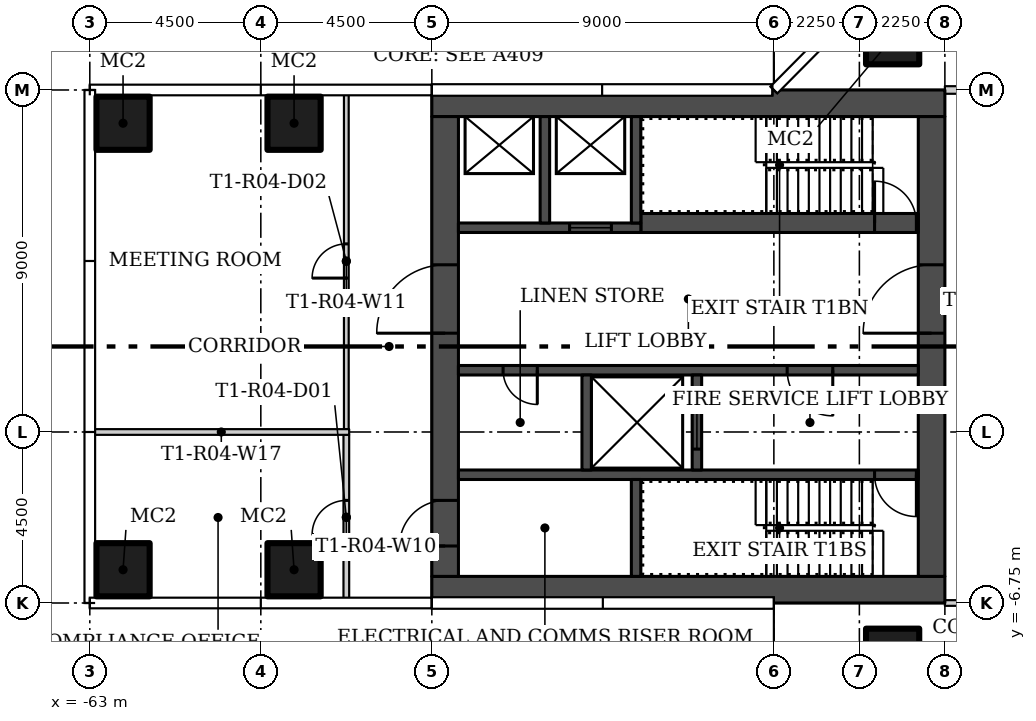
"""IFC4 building model, lengths in metres.
Left out: names, types, materials, properties, quantities, classifications, styles, units other than length and angle.
Written with IfcOpenShell. Run it as: python <this file> out.ifc"""

import sys

from ifc_helpers import new_model, si_unit, direction, frame, frame_2d, origin, origin_2d, place, context, subcontext, project, spatial, rectangle, hollow_rectangle, extrude, element, fill, save


model = new_model("IFC4")
c1 = context("Model", 3, precision=1e-05, world=origin(), true_north=direction((0.0, 1.0)))
c2 = subcontext(c1, "Body", "Model", "MODEL_VIEW")
j1 = project(units=[si_unit("LENGTHUNIT", "METRE"), si_unit("PLANEANGLEUNIT", "RADIAN")], contexts=[c1])
p1 = place(None, origin())
s1 = spatial("IfcSite", under=j1, at=p1, CompositionType="ELEMENT")
p2 = place(p1, origin())
s2 = spatial("IfcBuilding", under=s1, at=p2, CompositionType="ELEMENT")
p3 = place(p2, frame((0.0, 0.0, 49.8)))
s3 = spatial("IfcBuildingStorey", under=s2, at=p3, CompositionType="ELEMENT", Elevation=49.8)
for number, where in (
    (1, (-41.875, 8.125, 0.0)),
    (2, (-41.875, -8.125, 0.0)),
    (3, (-57.625, -5.875, 0.0)),
    (4, (-62.125, -5.875, 0.0)),
    (5, (-57.625, 5.875, 0.0)),
    (6, (-62.125, 5.875, 0.0)),
):
    element("IfcColumn", number, at=place(p3, frame(where)), inside=s3, PredefinedType="COLUMN", context=c2, shape_type="SweptSolid", body=[
        extrude(hollow_rectangle(XDim=1.4, YDim=1.4, WallThickness=0.05, at=origin_2d()), origin(), (0.0, 0.0, 1.0), 3.55),
    ])
p4 = place(p3, frame((-40.5, 6.75, 0.0)))
e7 = element("IfcWall", 7, at=p4, inside=s3, PredefinedType="PARTITIONING", context=c2, shape_type="SweptSolid", body=[
    extrude(rectangle(XDim=4.6, YDim=0.2, at=frame_2d((2.3, 0.0))), origin(), (0.0, 0.0, 1.0), 3.55),
])
p5 = place(p4, frame((1.5, 0.0, 0.0)))
e8 = element("IfcOpeningElement", 8, at=p5, cuts=e7, PredefinedType="OPENING", context=c2, shape_type="SweptSolid", body=[
    extrude(rectangle(XDim=1.5, YDim=2.1, at=frame_2d((0.75, 1.05))), frame((0.0, 0.11, 0.0), z_axis=(0.0, -1.0, 0.0), x_axis=(1.0, 0.0, 0.0)), (0.0, 0.0, 1.0), 0.22),
])
p6 = place(p3, frame((-27.0, -6.75, 0.0), z_axis=(0.0, 0.0, 1.0), x_axis=(-1.0, 0.0, 0.0)))
e9 = element("IfcWall", 9, at=p6, inside=s3, PredefinedType="PARTITIONING", context=c2, shape_type="SweptSolid", body=[
    extrude(rectangle(XDim=13.5, YDim=0.15, at=frame_2d((6.75, 0.0))), origin(), (0.0, 0.0, 1.0), 3.55),
])
p7 = place(p6, frame((6.0, 0.0, 0.0)))
e10 = element("IfcOpeningElement", 10, at=p7, cuts=e9, PredefinedType="OPENING", context=c2, shape_type="SweptSolid", body=[
    extrude(rectangle(XDim=1.5, YDim=2.1, at=frame_2d((0.75, 1.05))), frame((0.0, 0.085, 0.0), z_axis=(0.0, -1.0, 0.0), x_axis=(1.0, 0.0, 0.0)), (0.0, 0.0, 1.0), 0.17),
])
p8 = place(p3, frame((-56.25, -6.655, 0.0), z_axis=(0.0, 0.0, 1.0), x_axis=(0.0, 1.0, 0.0)))
e11 = element("IfcWall", 11, at=p8, inside=s3, PredefinedType="PARTITIONING", context=c2, shape_type="SweptSolid", body=[
    extrude(rectangle(XDim=4.33, YDim=0.15, at=frame_2d((2.165, 0.0))), origin(), (0.0, 0.0, 1.0), 3.55),
])
p9 = place(p8, frame((1.705, 0.0, 0.0)))
e12 = element("IfcOpeningElement", 12, at=p9, cuts=e11, PredefinedType="OPENING", context=c2, shape_type="SweptSolid", body=[
    extrude(rectangle(XDim=0.9, YDim=2.1, at=frame_2d((0.45, 1.05))), frame((0.0, 0.085, 0.0), z_axis=(0.0, -1.0, 0.0), x_axis=(1.0, 0.0, 0.0)), (0.0, 0.0, 1.0), 0.17),
])
p10 = place(p3, frame((-56.25, -2.175, 0.0), z_axis=(0.0, 0.0, 1.0), x_axis=(0.0, 1.0, 0.0)))
e13 = element("IfcWall", 13, at=p10, inside=s3, PredefinedType="PARTITIONING", context=c2, shape_type="SweptSolid", body=[
    extrude(rectangle(XDim=8.83, YDim=0.125, at=frame_2d((4.415, 0.0))), origin(), (0.0, 0.0, 1.0), 3.55),
])
p11 = place(p10, frame((3.975, 0.0, 0.0)))
e14 = element("IfcOpeningElement", 14, at=p11, cuts=e13, PredefinedType="OPENING", context=c2, shape_type="SweptSolid", body=[
    extrude(rectangle(XDim=0.9, YDim=2.1, at=frame_2d((0.45, 1.05))), frame((0.0, 0.073, 0.0), z_axis=(0.0, -1.0, 0.0), x_axis=(1.0, 0.0, 0.0)), (0.0, 0.0, 1.0), 0.145),
])
p12 = place(p3, frame((-56.175, -2.25, 0.0), z_axis=(0.0, 0.0, 1.0), x_axis=(-1.0, 0.0, 0.0)))
e15 = element("IfcWall", 15, at=p12, inside=s3, PredefinedType="PARTITIONING", context=c2, shape_type="SweptSolid", body=[
    extrude(rectangle(XDim=6.73, YDim=0.15, at=frame_2d((3.365, 0.0))), origin(), (0.0, 0.0, 1.0), 3.55),
])
for number, where, z_axis, x_axis in (
    (16, (-40.5, -6.4, 0.0), (0.0, 0.0, 1.0), (-1.0, 0.0, 0.0)),
    (17, (-40.5, 6.4, 0.0), (0.0, 0.0, 1.0), (-1.0, 0.0, 0.0)),
):
    element("IfcWall", number, at=place(p3, frame(where, z_axis=z_axis, x_axis=x_axis)), inside=s3, PredefinedType="SHEAR", context=c2, shape_type="SweptSolid", body=[
        extrude(rectangle(XDim=13.5, YDim=0.7, at=frame_2d((6.75, 0.0))), origin(), (0.0, 0.0, 1.0), 3.55),
    ])
p13 = place(p3, frame((-40.85, -6.05, 0.0), z_axis=(0.0, 0.0, 1.0), x_axis=(0.0, 1.0, 0.0)))
e18 = element("IfcWall", 18, at=p13, inside=s3, PredefinedType="SHEAR", context=c2, shape_type="SweptSolid", body=[
    extrude(rectangle(XDim=12.1, YDim=0.7, at=frame_2d((6.05, 0.0))), origin(), (0.0, 0.0, 1.0), 3.55),
])
p14 = place(p13, frame((6.4, 0.0, 0.0)))
e19 = element("IfcOpeningElement", 19, at=p14, cuts=e18, PredefinedType="OPENING", context=c2, shape_type="SweptSolid", body=[
    extrude(rectangle(XDim=1.8, YDim=2.4, at=frame_2d((0.9, 1.2))), frame((0.0, 0.36, 0.0), z_axis=(0.0, -1.0, 0.0), x_axis=(1.0, 0.0, 0.0)), (0.0, 0.0, 1.0), 0.72),
])
p15 = place(p3, frame((-53.65, -6.05, 0.0), z_axis=(0.0, 0.0, 1.0), x_axis=(0.0, 1.0, 0.0)))
e20 = element("IfcWall", 20, at=p15, inside=s3, PredefinedType="SHEAR", context=c2, shape_type="SweptSolid", body=[
    extrude(rectangle(XDim=12.1, YDim=0.7, at=frame_2d((6.05, 0.0))), origin(), (0.0, 0.0, 1.0), 3.55),
])
p16 = place(p15, frame((0.8, 0.0, 0.0)))
e21 = element("IfcOpeningElement", 21, at=p16, cuts=e20, PredefinedType="OPENING", context=c2, shape_type="SweptSolid", body=[
    extrude(rectangle(XDim=1.2, YDim=2.1, at=frame_2d((0.6, 1.05))), frame((0.0, 0.36, 0.0), z_axis=(0.0, -1.0, 0.0), x_axis=(1.0, 0.0, 0.0)), (0.0, 0.0, 1.0), 0.72),
])
p17 = place(p15, frame((6.4, 0.0, 0.0)))
e22 = element("IfcOpeningElement", 22, at=p17, cuts=e20, PredefinedType="OPENING", context=c2, shape_type="SweptSolid", body=[
    extrude(rectangle(XDim=1.8, YDim=2.4, at=frame_2d((0.9, 1.2))), frame((0.0, 0.36, 0.0), z_axis=(0.0, -1.0, 0.0), x_axis=(1.0, 0.0, 0.0)), (0.0, 0.0, 1.0), 0.72),
])
p18 = place(p3, frame((-41.2, -3.375, 0.0), z_axis=(0.0, 0.0, 1.0), x_axis=(-1.0, 0.0, 0.0)))
e23 = element("IfcWall", 23, at=p18, inside=s3, PredefinedType="SHEAR", context=c2, shape_type="SweptSolid", body=[
    extrude(rectangle(XDim=12.1, YDim=0.25, at=frame_2d((6.05, 0.0))), origin(), (0.0, 0.0, 1.0), 3.55),
])
p19 = place(p18, frame((0.05, 0.0, 0.0)))
e24 = element("IfcOpeningElement", 24, at=p19, cuts=e23, PredefinedType="OPENING", context=c2, shape_type="SweptSolid", body=[
    extrude(rectangle(XDim=1.1, YDim=2.1, at=frame_2d((0.55, 1.05))), frame((0.0, 0.135, 0.0), z_axis=(0.0, -1.0, 0.0), x_axis=(1.0, 0.0, 0.0)), (0.0, 0.0, 1.0), 0.27),
])
p20 = place(p3, frame((-48.625, -6.05, 0.0), z_axis=(0.0, 0.0, 1.0), x_axis=(0.0, 1.0, 0.0)))
e25 = element("IfcWall", 25, at=p20, inside=s3, PredefinedType="SHEAR", context=c2, shape_type="SweptSolid", body=[
    extrude(rectangle(XDim=2.55, YDim=0.25, at=frame_2d((1.275, 0.0))), origin(), (0.0, 0.0, 1.0), 3.55),
])
p21 = place(p3, frame((-41.2, -0.625, 0.0), z_axis=(0.0, 0.0, 1.0), x_axis=(-1.0, 0.0, 0.0)))
e26 = element("IfcWall", 26, at=p21, inside=s3, PredefinedType="SHEAR", context=c2, shape_type="SweptSolid", body=[
    extrude(rectangle(XDim=12.1, YDim=0.25, at=frame_2d((6.05, 0.0))), origin(), (0.0, 0.0, 1.0), 3.55),
])
p22 = place(p21, frame((2.25, 0.0, 0.0)))
e27 = element("IfcOpeningElement", 27, at=p22, cuts=e26, PredefinedType="OPENING", context=c2, shape_type="SweptSolid", body=[
    extrude(rectangle(XDim=1.2, YDim=2.1, at=frame_2d((0.6, 1.05))), frame((0.0, 0.135, 0.0), z_axis=(0.0, -1.0, 0.0), x_axis=(1.0, 0.0, 0.0)), (0.0, 0.0, 1.0), 0.27),
])
p23 = place(p21, frame((10.025, 0.0, 0.0)))
e28 = element("IfcOpeningElement", 28, at=p23, cuts=e26, PredefinedType="OPENING", context=c2, shape_type="SweptSolid", body=[
    extrude(rectangle(XDim=0.9, YDim=2.1, at=frame_2d((0.45, 1.05))), frame((0.0, 0.135, 0.0), z_axis=(0.0, -1.0, 0.0), x_axis=(1.0, 0.0, 0.0)), (0.0, 0.0, 1.0), 0.27),
])
p24 = place(p3, frame((-47.025, -3.25, 0.0), z_axis=(0.0, 0.0, 1.0), x_axis=(0.0, 1.0, 0.0)))
e29 = element("IfcWall", 29, at=p24, inside=s3, PredefinedType="SHEAR", context=c2, shape_type="SweptSolid", body=[
    extrude(rectangle(XDim=2.5, YDim=0.25, at=frame_2d((1.25, 0.0))), origin(), (0.0, 0.0, 1.0), 3.55),
])
p25 = place(p24, frame((0.55, 0.0, 0.0)))
e30 = element("IfcOpeningElement", 30, at=p25, cuts=e29, PredefinedType="OPENING", context=c2, shape_type="SweptSolid", body=[
    extrude(rectangle(XDim=1.4, YDim=2.4, at=frame_2d((0.7, 1.2))), frame((0.0, 0.135, 0.0), z_axis=(0.0, -1.0, 0.0), x_axis=(1.0, 0.0, 0.0)), (0.0, 0.0, 1.0), 0.27),
])
p26 = place(p3, frame((-49.925, -3.25, 0.0), z_axis=(0.0, 0.0, 1.0), x_axis=(0.0, 1.0, 0.0)))
e31 = element("IfcWall", 31, at=p26, inside=s3, PredefinedType="SHEAR", context=c2, shape_type="SweptSolid", body=[
    extrude(rectangle(XDim=2.5, YDim=0.25, at=frame_2d((1.25, 0.0))), origin(), (0.0, 0.0, 1.0), 3.55),
])
p27 = place(p3, frame((-48.5, 3.25, 0.0)))
e32 = element("IfcWall", 32, at=p27, inside=s3, PredefinedType="SHEAR", context=c2, shape_type="SweptSolid", body=[
    extrude(rectangle(XDim=7.3, YDim=0.5, at=frame_2d((3.65, 0.0))), origin(), (0.0, 0.0, 1.0), 3.55),
])
p28 = place(p27, frame((6.15, 0.0, 0.0)))
e33 = element("IfcOpeningElement", 33, at=p28, cuts=e32, PredefinedType="OPENING", context=c2, shape_type="SweptSolid", body=[
    extrude(rectangle(XDim=1.1, YDim=2.1, at=frame_2d((0.55, 1.05))), frame((0.0, 0.26, 0.0), z_axis=(0.0, -1.0, 0.0), x_axis=(1.0, 0.0, 0.0)), (0.0, 0.0, 1.0), 0.52),
])
p29 = place(p3, frame((-48.5, 3.125, 0.0), z_axis=(0.0, 0.0, 1.0), x_axis=(-1.0, 0.0, 0.0)))
e34 = element("IfcWall", 34, at=p29, inside=s3, PredefinedType="SHEAR", context=c2, shape_type="SweptSolid", body=[
    extrude(rectangle(XDim=4.8, YDim=0.25, at=frame_2d((2.4, 0.0))), origin(), (0.0, 0.0, 1.0), 3.55),
])
p30 = place(p29, frame((0.775, 0.0, 0.0)))
e35 = element("IfcOpeningElement", 35, at=p30, cuts=e34, PredefinedType="OPENING", context=c2, shape_type="SweptSolid", body=[
    extrude(rectangle(XDim=1.1, YDim=2.1, at=frame_2d((0.55, 1.05))), frame((0.0, 0.135, 0.0), z_axis=(0.0, -1.0, 0.0), x_axis=(1.0, 0.0, 0.0)), (0.0, 0.0, 1.0), 0.27),
])
for number, where, z_axis, x_axis in (
    (36, (-48.625, 3.25, 0.0), (0.0, 0.0, 1.0), (0.0, 1.0, 0.0)),
    (37, (-51.025, 3.25, 0.0), (0.0, 0.0, 1.0), (0.0, 1.0, 0.0)),
):
    element("IfcWall", number, at=place(p3, frame(where, z_axis=z_axis, x_axis=x_axis)), inside=s3, PredefinedType="SHEAR", context=c2, shape_type="SweptSolid", body=[
        extrude(rectangle(XDim=2.8, YDim=0.25, at=frame_2d((1.4, 0.0))), origin(), (0.0, 0.0, 1.0), 3.55),
    ])
p31 = place(p9, origin())
e38 = element("IfcDoor", 38, at=p31, inside=s3, OperationType="SINGLE_SWING_LEFT", PredefinedType="DOOR", context=c2, shape_type="SweptSolid", body=[
    extrude(rectangle(XDim=0.9, YDim=2.1, at=frame_2d((0.45, 1.05))), frame((0.0, 0.025, 0.0), z_axis=(0.0, -1.0, 0.0), x_axis=(1.0, 0.0, 0.0)), (0.0, 0.0, 1.0), 0.05),
])
fill(e12, e38)
p32 = place(p11, origin())
e39 = element("IfcDoor", 39, at=p32, inside=s3, OperationType="SINGLE_SWING_RIGHT", PredefinedType="DOOR", context=c2, shape_type="SweptSolid", body=[
    extrude(rectangle(XDim=0.9, YDim=2.1, at=frame_2d((0.45, 1.05))), frame((0.0, 0.025, 0.0), z_axis=(0.0, -1.0, 0.0), x_axis=(1.0, 0.0, 0.0)), (0.0, 0.0, 1.0), 0.05),
])
fill(e14, e39)
p33 = place(p14, origin())
e40 = element("IfcDoor", 40, at=p33, inside=s3, OperationType="DOUBLE_DOOR_SINGLE_SWING", PredefinedType="DOOR", context=c2, shape_type="SweptSolid", body=[
    extrude(rectangle(XDim=1.8, YDim=2.4, at=frame_2d((0.9, 1.2))), frame((0.0, 0.025, 0.0), z_axis=(0.0, -1.0, 0.0), x_axis=(1.0, 0.0, 0.0)), (0.0, 0.0, 1.0), 0.05),
])
fill(e19, e40)
p34 = place(p16, origin())
e41 = element("IfcDoor", 41, at=p34, inside=s3, OperationType="SINGLE_SWING_LEFT", PredefinedType="DOOR", context=c2, shape_type="SweptSolid", body=[
    extrude(rectangle(XDim=1.2, YDim=2.1, at=frame_2d((0.6, 1.05))), frame((0.0, 0.025, 0.0), z_axis=(0.0, -1.0, 0.0), x_axis=(1.0, 0.0, 0.0)), (0.0, 0.0, 1.0), 0.05),
])
fill(e21, e41)
p35 = place(p17, origin())
e42 = element("IfcDoor", 42, at=p35, inside=s3, OperationType="DOUBLE_DOOR_SINGLE_SWING", PredefinedType="DOOR", context=c2, shape_type="SweptSolid", body=[
    extrude(rectangle(XDim=1.8, YDim=2.4, at=frame_2d((0.9, 1.2))), frame((0.0, 0.025, 0.0), z_axis=(0.0, -1.0, 0.0), x_axis=(1.0, 0.0, 0.0)), (0.0, 0.0, 1.0), 0.05),
])
fill(e22, e42)
p36 = place(p19, origin())
e43 = element("IfcDoor", 43, at=p36, inside=s3, OperationType="SINGLE_SWING_LEFT", PredefinedType="DOOR", context=c2, shape_type="SweptSolid", body=[
    extrude(rectangle(XDim=1.1, YDim=2.1, at=frame_2d((0.55, 1.05))), frame((0.0, 0.025, 0.0), z_axis=(0.0, -1.0, 0.0), x_axis=(1.0, 0.0, 0.0)), (0.0, 0.0, 1.0), 0.05),
])
fill(e24, e43)
p37 = place(p22, origin())
e44 = element("IfcDoor", 44, at=p37, inside=s3, OperationType="SINGLE_SWING_LEFT", PredefinedType="DOOR", context=c2, shape_type="SweptSolid", body=[
    extrude(rectangle(XDim=1.2, YDim=2.1, at=frame_2d((0.6, 1.05))), frame((0.0, 0.025, 0.0), z_axis=(0.0, -1.0, 0.0), x_axis=(1.0, 0.0, 0.0)), (0.0, 0.0, 1.0), 0.05),
])
fill(e27, e44)
p38 = place(p23, origin())
e45 = element("IfcDoor", 45, at=p38, inside=s3, OperationType="SINGLE_SWING_RIGHT", PredefinedType="DOOR", context=c2, shape_type="SweptSolid", body=[
    extrude(rectangle(XDim=0.9, YDim=2.1, at=frame_2d((0.45, 1.05))), frame((0.0, 0.025, 0.0), z_axis=(0.0, -1.0, 0.0), x_axis=(1.0, 0.0, 0.0)), (0.0, 0.0, 1.0), 0.05),
])
fill(e28, e45)
p39 = place(p25, origin())
e46 = element("IfcDoor", 46, at=p39, inside=s3, OperationType="SLIDING_TO_LEFT", PredefinedType="DOOR", context=c2, shape_type="SweptSolid", body=[
    extrude(rectangle(XDim=1.4, YDim=2.4, at=frame_2d((0.7, 1.2))), frame((0.0, 0.025, 0.0), z_axis=(0.0, -1.0, 0.0), x_axis=(1.0, 0.0, 0.0)), (0.0, 0.0, 1.0), 0.05),
])
fill(e30, e46)
p40 = place(p28, origin())
e47 = element("IfcDoor", 47, at=p40, inside=s3, OperationType="SINGLE_SWING_RIGHT", PredefinedType="DOOR", context=c2, shape_type="SweptSolid", body=[
    extrude(rectangle(XDim=1.1, YDim=2.1, at=frame_2d((0.55, 1.05))), frame((0.0, 0.025, 0.0), z_axis=(0.0, -1.0, 0.0), x_axis=(1.0, 0.0, 0.0)), (0.0, 0.0, 1.0), 0.05),
])
fill(e33, e47)
p41 = place(p30, origin())
e48 = element("IfcDoor", 48, at=p41, inside=s3, OperationType="SLIDING_TO_LEFT", PredefinedType="DOOR", context=c2, shape_type="SweptSolid", body=[
    extrude(rectangle(XDim=1.1, YDim=2.1, at=frame_2d((0.55, 1.05))), frame((0.0, 0.025, 0.0), z_axis=(0.0, -1.0, 0.0), x_axis=(1.0, 0.0, 0.0)), (0.0, 0.0, 1.0), 0.05),
])
fill(e35, e48)
save(model, sys.argv[1])
